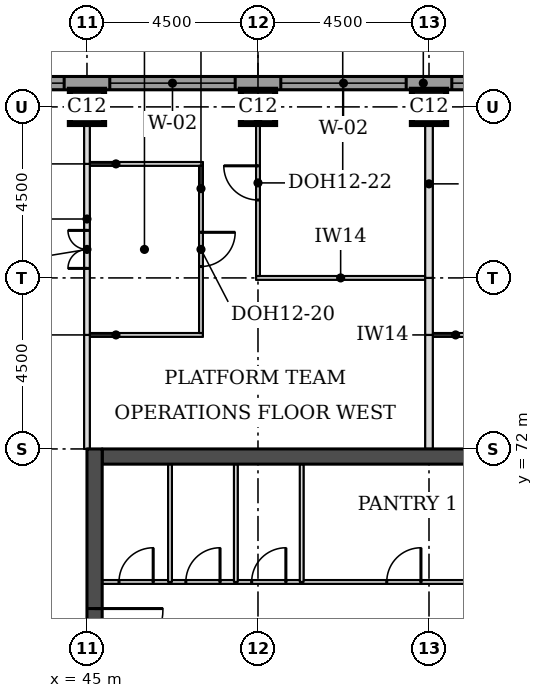
"""IFC4 building model, lengths in metres.
Left out: names, types, materials, properties, quantities, classifications, styles, units other than length and angle.
Written with IfcOpenShell. Run it as: python <this file> out.ifc"""

import sys

from ifc_helpers import new_model, si_unit, direction, frame, frame_2d, origin, origin_2d, place, context, subcontext, project, spatial, rectangle, extrude, element, fill, save


model = new_model("IFC4")
c1 = context("Model", 3, precision=1e-05, world=origin(), true_north=direction((0.0, 1.0)))
c2 = subcontext(c1, "Body", "Model", "MODEL_VIEW")
j1 = project(units=[si_unit("LENGTHUNIT", "METRE"), si_unit("PLANEANGLEUNIT", "RADIAN")], contexts=[c1])
p1 = place(None, origin())
s1 = spatial("IfcSite", under=j1, at=p1, CompositionType="ELEMENT")
p2 = place(p1, origin())
s2 = spatial("IfcBuilding", under=s1, at=p2, CompositionType="ELEMENT")
p3 = place(p2, frame((0.0, 0.0, 252.6)))
s3 = spatial("IfcBuildingStorey", under=s2, at=p3, CompositionType="ELEMENT", Elevation=252.6)
for number, where, z_axis, x_axis in (
    (1, (45.0, 81.0, 0.0), (0.0, 0.0, 1.0), (1.0, 0.0, 0.0)),
    (2, (49.5, 81.0, 0.0), (0.0, 0.0, 1.0), (1.0, 0.0, 0.0)),
    (3, (54.0, 81.0, 0.0), (0.0, 0.0, 1.0), (1.0, 0.0, 0.0)),
):
    element("IfcColumn", number, at=place(p3, frame(where, z_axis=z_axis, x_axis=x_axis)), inside=s3, PredefinedType="COLUMN", context=c2, shape_type="SweptSolid", body=[
        extrude(rectangle(XDim=0.9, YDim=0.9, at=origin_2d()), origin(), (0.0, 0.0, 1.0), 3.7),
    ])
p4 = place(p3, frame((45.4, 71.8, 0.0), z_axis=(0.0, 0.0, 1.0), x_axis=(1.0, 0.0, 0.0)))
e4 = element("IfcWall", 4, at=p4, inside=s3, PredefinedType="SHEAR", context=c2, shape_type="SweptSolid", body=[
    extrude(rectangle(XDim=21.7, YDim=0.4, at=frame_2d((10.85, 0.0))), origin(), (0.0, 0.0, 1.0), 3.7),
])
p5 = place(p3, frame((45.2, 49.5, 0.0), z_axis=(0.0, 0.0, 1.0), x_axis=(0.0, 1.0, 0.0)))
e5 = element("IfcWall", 5, at=p5, inside=s3, PredefinedType="SHEAR", context=c2, shape_type="SweptSolid", body=[
    extrude(rectangle(XDim=22.5, YDim=0.4, at=frame_2d((11.25, 0.0))), origin(), (0.0, 0.0, 1.0), 3.7),
])
p6 = place(p5, frame((4.2, 0.0, 0.0)))
e6 = element("IfcOpeningElement", 6, at=p6, cuts=e5, PredefinedType="OPENING", context=c2, shape_type="SweptSolid", body=[
    extrude(rectangle(XDim=1.8, YDim=2.1, at=frame_2d((0.9, 1.05))), frame((0.0, 0.21, 0.0), z_axis=(0.0, -1.0, 0.0), x_axis=(1.0, 0.0, 0.0)), (0.0, 0.0, 1.0), 0.42),
])
p7 = place(p5, frame((6.9, 0.0, 0.0)))
e7 = element("IfcOpeningElement", 7, at=p7, cuts=e5, PredefinedType="OPENING", context=c2, shape_type="SweptSolid", body=[
    extrude(rectangle(XDim=1.1, YDim=2.1, at=frame_2d((0.55, 1.05))), frame((0.0, 0.21, 0.0), z_axis=(0.0, -1.0, 0.0), x_axis=(1.0, 0.0, 0.0)), (0.0, 0.0, 1.0), 0.42),
])
p8 = place(p5, frame((13.6, 0.0, 0.0)))
e8 = element("IfcOpeningElement", 8, at=p8, cuts=e5, PredefinedType="OPENING", context=c2, shape_type="SweptSolid", body=[
    extrude(rectangle(XDim=1.1, YDim=2.1, at=frame_2d((0.55, 1.05))), frame((0.0, 0.21, 0.0), z_axis=(0.0, -1.0, 0.0), x_axis=(1.0, 0.0, 0.0)), (0.0, 0.0, 1.0), 0.42),
])
p9 = place(p5, frame((16.5, 0.0, 0.0)))
e9 = element("IfcOpeningElement", 9, at=p9, cuts=e5, PredefinedType="OPENING", context=c2, shape_type="SweptSolid", body=[
    extrude(rectangle(XDim=1.8, YDim=2.1, at=frame_2d((0.9, 1.05))), frame((0.0, 0.21, 0.0), z_axis=(0.0, -1.0, 0.0), x_axis=(1.0, 0.0, 0.0)), (0.0, 0.0, 1.0), 0.42),
])
p10 = place(p3, frame((72.331, 81.625, 0.0), z_axis=(0.0, 0.0, 1.0), x_axis=(-1.0, 0.0, 0.0)))
e10 = element("IfcWall", 10, at=p10, inside=s3, PredefinedType="STANDARD", context=c2, shape_type="SweptSolid", body=[
    extrude(rectangle(XDim=32.163, YDim=0.35, at=frame_2d((16.081, 0.0))), origin(), (0.0, 0.0, 1.0), 3.525),
])
p11 = place(p10, frame((0.931, 0.0, 0.9)))
e11 = element("IfcOpeningElement", 11, at=p11, cuts=e10, PredefinedType="OPENING", context=c2, shape_type="SweptSolid", body=[
    extrude(rectangle(XDim=3.3, YDim=1.9, at=frame_2d((1.65, 0.95))), frame((0.0, 0.185, 0.0), z_axis=(0.0, -1.0, 0.0), x_axis=(1.0, 0.0, 0.0)), (0.0, 0.0, 1.0), 0.37),
])
p12 = place(p10, frame((5.431, 0.0, 0.9)))
e12 = element("IfcOpeningElement", 12, at=p12, cuts=e10, PredefinedType="OPENING", context=c2, shape_type="SweptSolid", body=[
    extrude(rectangle(XDim=3.3, YDim=1.9, at=frame_2d((1.65, 0.95))), frame((0.0, 0.185, 0.0), z_axis=(0.0, -1.0, 0.0), x_axis=(1.0, 0.0, 0.0)), (0.0, 0.0, 1.0), 0.37),
])
p13 = place(p10, frame((9.931, 0.0, 0.9)))
e13 = element("IfcOpeningElement", 13, at=p13, cuts=e10, PredefinedType="OPENING", context=c2, shape_type="SweptSolid", body=[
    extrude(rectangle(XDim=3.3, YDim=1.9, at=frame_2d((1.65, 0.95))), frame((0.0, 0.185, 0.0), z_axis=(0.0, -1.0, 0.0), x_axis=(1.0, 0.0, 0.0)), (0.0, 0.0, 1.0), 0.37),
])
p14 = place(p10, frame((14.431, 0.0, 0.9)))
e14 = element("IfcOpeningElement", 14, at=p14, cuts=e10, PredefinedType="OPENING", context=c2, shape_type="SweptSolid", body=[
    extrude(rectangle(XDim=3.3, YDim=1.9, at=frame_2d((1.65, 0.95))), frame((0.0, 0.185, 0.0), z_axis=(0.0, -1.0, 0.0), x_axis=(1.0, 0.0, 0.0)), (0.0, 0.0, 1.0), 0.37),
])
p15 = place(p10, frame((18.931, 0.0, 0.9)))
e15 = element("IfcOpeningElement", 15, at=p15, cuts=e10, PredefinedType="OPENING", context=c2, shape_type="SweptSolid", body=[
    extrude(rectangle(XDim=3.3, YDim=1.9, at=frame_2d((1.65, 0.95))), frame((0.0, 0.185, 0.0), z_axis=(0.0, -1.0, 0.0), x_axis=(1.0, 0.0, 0.0)), (0.0, 0.0, 1.0), 0.37),
])
p16 = place(p10, frame((23.431, 0.0, 0.9)))
e16 = element("IfcOpeningElement", 16, at=p16, cuts=e10, PredefinedType="OPENING", context=c2, shape_type="SweptSolid", body=[
    extrude(rectangle(XDim=3.3, YDim=1.9, at=frame_2d((1.65, 0.95))), frame((0.0, 0.185, 0.0), z_axis=(0.0, -1.0, 0.0), x_axis=(1.0, 0.0, 0.0)), (0.0, 0.0, 1.0), 0.37),
])
p17 = place(p10, frame((27.931, 0.0, 0.9)))
e17 = element("IfcOpeningElement", 17, at=p17, cuts=e10, PredefinedType="OPENING", context=c2, shape_type="SweptSolid", body=[
    extrude(rectangle(XDim=3.3, YDim=1.9, at=frame_2d((1.65, 0.95))), frame((0.0, 0.185, 0.0), z_axis=(0.0, -1.0, 0.0), x_axis=(1.0, 0.0, 0.0)), (0.0, 0.0, 1.0), 0.37),
])
p18 = place(p3, frame((45.075, 75.0, 0.0), z_axis=(0.0, 0.0, 1.0), x_axis=(1.0, 0.0, 0.0)))
e18 = element("IfcWall", 18, at=p18, inside=s3, PredefinedType="PARTITIONING", context=c2, shape_type="SweptSolid", body=[
    extrude(rectangle(XDim=2.975, YDim=0.1, at=frame_2d((1.488, 0.0))), origin(), (0.0, 0.0, 1.0), 3.55),
])
p19 = place(p3, frame((54.1, 75.0, 0.0), z_axis=(0.0, 0.0, 1.0), x_axis=(1.0, 0.0, 0.0)))
e19 = element("IfcWall", 19, at=p19, inside=s3, PredefinedType="PARTITIONING", context=c2, shape_type="SweptSolid", body=[
    extrude(rectangle(XDim=4.4, YDim=0.1, at=frame_2d((2.2, 0.0))), origin(), (0.0, 0.0, 1.0), 3.55),
])
p20 = place(p19, frame((1.75, 0.0, 0.0)))
e20 = element("IfcOpeningElement", 20, at=p20, cuts=e19, PredefinedType="OPENING", context=c2, shape_type="SweptSolid", body=[
    extrude(rectangle(XDim=0.9, YDim=2.1, at=frame_2d((0.45, 1.05))), frame((0.0, 0.06, 0.0), z_axis=(0.0, -1.0, 0.0), x_axis=(1.0, 0.0, 0.0)), (0.0, 0.0, 1.0), 0.12),
])
p21 = place(p3, frame((49.45, 76.5, 0.0), z_axis=(0.0, 0.0, 1.0), x_axis=(1.0, 0.0, 0.0)))
e21 = element("IfcWall", 21, at=p21, inside=s3, PredefinedType="PARTITIONING", context=c2, shape_type="SweptSolid", body=[
    extrude(rectangle(XDim=4.45, YDim=0.1, at=frame_2d((2.225, 0.0))), origin(), (0.0, 0.0, 1.0), 3.55),
])
p22 = place(p3, frame((45.075, 79.5, 0.0), z_axis=(0.0, 0.0, 1.0), x_axis=(1.0, 0.0, 0.0)))
e22 = element("IfcWall", 22, at=p22, inside=s3, PredefinedType="PARTITIONING", context=c2, shape_type="SweptSolid", body=[
    extrude(rectangle(XDim=2.975, YDim=0.1, at=frame_2d((1.488, 0.0))), origin(), (0.0, 0.0, 1.0), 3.55),
])
p23 = place(p3, frame((45.0, 72.0, 0.0), z_axis=(0.0, 0.0, 1.0), x_axis=(0.0, 1.0, 0.0)))
e23 = element("IfcWall", 23, at=p23, inside=s3, PredefinedType="PARTITIONING", context=c2, shape_type="SweptSolid", body=[
    extrude(rectangle(XDim=3.0, YDim=0.15, at=frame_2d((1.5, 0.0))), origin(), (0.0, 0.0, 1.0), 3.022),
])
p24 = place(p3, frame((54.0, 72.0, 0.0), z_axis=(0.0, 0.0, 1.0), x_axis=(0.0, 1.0, 0.0)))
e24 = element("IfcWall", 24, at=p24, inside=s3, PredefinedType="PARTITIONING", context=c2, shape_type="SweptSolid", body=[
    extrude(rectangle(XDim=3.0, YDim=0.2, at=frame_2d((1.5, 0.0))), origin(), (0.0, 0.0, 1.0), 3.55),
])
p25 = place(p3, frame((45.0, 75.0, 0.0), z_axis=(0.0, 0.0, 1.0), x_axis=(0.0, 1.0, 0.0)))
e25 = element("IfcWall", 25, at=p25, inside=s3, PredefinedType="PARTITIONING", context=c2, shape_type="SweptSolid", body=[
    extrude(rectangle(XDim=4.5, YDim=0.15, at=frame_2d((2.25, 0.0))), origin(), (0.0, 0.0, 1.0), 3.022),
])
p26 = place(p25, frame((1.75, 0.0, 0.0)))
e26 = element("IfcOpeningElement", 26, at=p26, cuts=e25, PredefinedType="OPENING", context=c2, shape_type="SweptSolid", body=[
    extrude(rectangle(XDim=1.0, YDim=2.1, at=frame_2d((0.5, 1.05))), frame((0.0, 0.085, 0.0), z_axis=(0.0, -1.0, 0.0), x_axis=(1.0, 0.0, 0.0)), (0.0, 0.0, 1.0), 0.17),
])
p27 = place(p3, frame((54.0, 75.0, 0.0), z_axis=(0.0, 0.0, 1.0), x_axis=(0.0, 1.0, 0.0)))
e27 = element("IfcWall", 27, at=p27, inside=s3, PredefinedType="PARTITIONING", context=c2, shape_type="SweptSolid", body=[
    extrude(rectangle(XDim=1.5, YDim=0.2, at=frame_2d((0.75, 0.0))), origin(), (0.0, 0.0, 1.0), 3.55),
])
p28 = place(p3, frame((48.0, 75.05, 0.0), z_axis=(0.0, 0.0, 1.0), x_axis=(0.0, 1.0, 0.0)))
e28 = element("IfcWall", 28, at=p28, inside=s3, PredefinedType="PARTITIONING", context=c2, shape_type="SweptSolid", body=[
    extrude(rectangle(XDim=4.4, YDim=0.1, at=frame_2d((2.2, 0.0))), origin(), (0.0, 0.0, 1.0), 3.55),
])
p29 = place(p28, frame((1.75, 0.0, 0.0)))
e29 = element("IfcOpeningElement", 29, at=p29, cuts=e28, PredefinedType="OPENING", context=c2, shape_type="SweptSolid", body=[
    extrude(rectangle(XDim=0.9, YDim=2.1, at=frame_2d((0.45, 1.05))), frame((0.0, 0.06, 0.0), z_axis=(0.0, -1.0, 0.0), x_axis=(1.0, 0.0, 0.0)), (0.0, 0.0, 1.0), 0.12),
])
p30 = place(p3, frame((54.0, 76.5, 0.0), z_axis=(0.0, 0.0, 1.0), x_axis=(0.0, 1.0, 0.0)))
e30 = element("IfcWall", 30, at=p30, inside=s3, PredefinedType="PARTITIONING", context=c2, shape_type="SweptSolid", body=[
    extrude(rectangle(XDim=4.95, YDim=0.2, at=frame_2d((2.475, 0.0))), origin(), (0.0, 0.0, 1.0), 3.55),
])
p31 = place(p3, frame((49.5, 76.55, 0.0), z_axis=(0.0, 0.0, 1.0), x_axis=(0.0, 1.0, 0.0)))
e31 = element("IfcWall", 31, at=p31, inside=s3, PredefinedType="PARTITIONING", context=c2, shape_type="SweptSolid", body=[
    extrude(rectangle(XDim=4.9, YDim=0.1, at=frame_2d((2.45, 0.0))), origin(), (0.0, 0.0, 1.0), 3.55),
])
p32 = place(p31, frame((2.0, 0.0, 0.0)))
e32 = element("IfcOpeningElement", 32, at=p32, cuts=e31, PredefinedType="OPENING", context=c2, shape_type="SweptSolid", body=[
    extrude(rectangle(XDim=0.9, YDim=2.1, at=frame_2d((0.45, 1.05))), frame((0.0, 0.06, 0.0), z_axis=(0.0, -1.0, 0.0), x_axis=(1.0, 0.0, 0.0)), (0.0, 0.0, 1.0), 0.12),
])
p33 = place(p3, frame((45.0, 79.5, 0.0), z_axis=(0.0, 0.0, 1.0), x_axis=(0.0, 1.0, 0.0)))
e33 = element("IfcWall", 33, at=p33, inside=s3, PredefinedType="PARTITIONING", context=c2, shape_type="SweptSolid", body=[
    extrude(rectangle(XDim=1.95, YDim=0.15, at=frame_2d((0.975, 0.0))), origin(), (0.0, 0.0, 1.0), 3.022),
])
p34 = place(p3, frame((45.4, 68.5, 0.0), z_axis=(0.0, 0.0, 1.0), x_axis=(1.0, 0.0, 0.0)))
e34 = element("IfcWall", 34, at=p34, inside=s3, PredefinedType="PARTITIONING", context=c2, shape_type="SweptSolid", body=[
    extrude(rectangle(XDim=21.7, YDim=0.1, at=frame_2d((10.85, 0.0))), origin(), (0.0, 0.0, 1.0), 3.55),
])
p35 = place(p34, frame((19.938, 0.0, 0.0)))
e35 = element("IfcOpeningElement", 35, at=p35, cuts=e34, PredefinedType="OPENING", context=c2, shape_type="SweptSolid", body=[
    extrude(rectangle(XDim=0.9, YDim=2.1, at=frame_2d((0.45, 1.05))), frame((0.0, 0.06, 0.0), z_axis=(0.0, -1.0, 0.0), x_axis=(1.0, 0.0, 0.0)), (0.0, 0.0, 1.0), 0.12),
])
p36 = place(p34, frame((17.312, 0.0, 0.0)))
e36 = element("IfcOpeningElement", 36, at=p36, cuts=e34, PredefinedType="OPENING", context=c2, shape_type="SweptSolid", body=[
    extrude(rectangle(XDim=0.9, YDim=2.1, at=frame_2d((0.45, 1.05))), frame((0.0, 0.06, 0.0), z_axis=(0.0, -1.0, 0.0), x_axis=(1.0, 0.0, 0.0)), (0.0, 0.0, 1.0), 0.12),
])
p37 = place(p34, frame((0.442, 0.0, 0.0)))
e37 = element("IfcOpeningElement", 37, at=p37, cuts=e34, PredefinedType="OPENING", context=c2, shape_type="SweptSolid", body=[
    extrude(rectangle(XDim=0.9, YDim=2.1, at=frame_2d((0.45, 1.05))), frame((0.0, 0.06, 0.0), z_axis=(0.0, -1.0, 0.0), x_axis=(1.0, 0.0, 0.0)), (0.0, 0.0, 1.0), 0.12),
])
p38 = place(p34, frame((2.201, 0.0, 0.0)))
e38 = element("IfcOpeningElement", 38, at=p38, cuts=e34, PredefinedType="OPENING", context=c2, shape_type="SweptSolid", body=[
    extrude(rectangle(XDim=0.9, YDim=2.1, at=frame_2d((0.45, 1.05))), frame((0.0, 0.06, 0.0), z_axis=(0.0, -1.0, 0.0), x_axis=(1.0, 0.0, 0.0)), (0.0, 0.0, 1.0), 0.12),
])
p39 = place(p34, frame((3.934, 0.0, 0.0)))
e39 = element("IfcOpeningElement", 39, at=p39, cuts=e34, PredefinedType="OPENING", context=c2, shape_type="SweptSolid", body=[
    extrude(rectangle(XDim=0.9, YDim=2.1, at=frame_2d((0.45, 1.05))), frame((0.0, 0.06, 0.0), z_axis=(0.0, -1.0, 0.0), x_axis=(1.0, 0.0, 0.0)), (0.0, 0.0, 1.0), 0.12),
])
p40 = place(p34, frame((14.432, 0.0, 0.0)))
e40 = element("IfcOpeningElement", 40, at=p40, cuts=e34, PredefinedType="OPENING", context=c2, shape_type="SweptSolid", body=[
    extrude(rectangle(XDim=0.9, YDim=2.1, at=frame_2d((0.45, 1.05))), frame((0.0, 0.06, 0.0), z_axis=(0.0, -1.0, 0.0), x_axis=(1.0, 0.0, 0.0)), (0.0, 0.0, 1.0), 0.12),
])
p41 = place(p34, frame((11.52, 0.0, 0.0)))
e41 = element("IfcOpeningElement", 41, at=p41, cuts=e34, PredefinedType="OPENING", context=c2, shape_type="SweptSolid", body=[
    extrude(rectangle(XDim=0.9, YDim=2.1, at=frame_2d((0.45, 1.05))), frame((0.0, 0.06, 0.0), z_axis=(0.0, -1.0, 0.0), x_axis=(1.0, 0.0, 0.0)), (0.0, 0.0, 1.0), 0.12),
])
p42 = place(p34, frame((7.488, 0.0, 0.0)))
e42 = element("IfcOpeningElement", 42, at=p42, cuts=e34, PredefinedType="OPENING", context=c2, shape_type="SweptSolid", body=[
    extrude(rectangle(XDim=0.9, YDim=2.1, at=frame_2d((0.45, 1.05))), frame((0.0, 0.06, 0.0), z_axis=(0.0, -1.0, 0.0), x_axis=(1.0, 0.0, 0.0)), (0.0, 0.0, 1.0), 0.12),
])
for number, where, z_axis, x_axis in (
    (43, (47.185, 68.5, 0.0), (0.0, 0.0, 1.0), (0.0, 1.0, 0.0)),
    (44, (48.917, 68.5, 0.0), (0.0, 0.0, 1.0), (0.0, 1.0, 0.0)),
    (45, (50.65, 68.5, 0.0), (0.0, 0.0, 1.0), (0.0, 1.0, 0.0)),
):
    element("IfcWall", number, at=place(p3, frame(where, z_axis=z_axis, x_axis=x_axis)), inside=s3, PredefinedType="PARTITIONING", context=c2, shape_type="SweptSolid", body=[
        extrude(rectangle(XDim=3.1, YDim=0.1, at=frame_2d((1.55, 0.0))), origin(), (0.0, 0.0, 1.0), 3.55),
    ])
p43 = place(p14, origin())
e46 = element("IfcWindow", 46, at=p43, inside=s3, PartitioningType="SINGLE_PANEL", PredefinedType="WINDOW", context=c2, shape_type="SweptSolid", body=[
    extrude(rectangle(XDim=3.3, YDim=1.9, at=frame_2d((1.65, 0.95))), frame((0.0, 0.085, 0.0), z_axis=(0.0, -1.0, 0.0), x_axis=(1.0, 0.0, 0.0)), (0.0, 0.0, 1.0), 0.06),
])
fill(e14, e46)
p44 = place(p15, origin())
e47 = element("IfcWindow", 47, at=p44, inside=s3, PartitioningType="SINGLE_PANEL", PredefinedType="WINDOW", context=c2, shape_type="SweptSolid", body=[
    extrude(rectangle(XDim=3.3, YDim=1.9, at=frame_2d((1.65, 0.95))), frame((0.0, 0.085, 0.0), z_axis=(0.0, -1.0, 0.0), x_axis=(1.0, 0.0, 0.0)), (0.0, 0.0, 1.0), 0.06),
])
fill(e15, e47)
p45 = place(p16, origin())
e48 = element("IfcWindow", 48, at=p45, inside=s3, PartitioningType="SINGLE_PANEL", PredefinedType="WINDOW", context=c2, shape_type="SweptSolid", body=[
    extrude(rectangle(XDim=3.3, YDim=1.9, at=frame_2d((1.65, 0.95))), frame((0.0, 0.085, 0.0), z_axis=(0.0, -1.0, 0.0), x_axis=(1.0, 0.0, 0.0)), (0.0, 0.0, 1.0), 0.06),
])
fill(e16, e48)
p46 = place(p17, origin())
e49 = element("IfcWindow", 49, at=p46, inside=s3, PartitioningType="SINGLE_PANEL", PredefinedType="WINDOW", context=c2, shape_type="SweptSolid", body=[
    extrude(rectangle(XDim=3.3, YDim=1.9, at=frame_2d((1.65, 0.95))), frame((0.0, 0.085, 0.0), z_axis=(0.0, -1.0, 0.0), x_axis=(1.0, 0.0, 0.0)), (0.0, 0.0, 1.0), 0.06),
])
fill(e17, e49)
p47 = place(p26, origin())
e50 = element("IfcDoor", 50, at=p47, inside=s3, OperationType="DOUBLE_DOOR_SINGLE_SWING", PredefinedType="DOOR", context=c2, shape_type="SweptSolid", body=[
    extrude(rectangle(XDim=1.0, YDim=2.1, at=frame_2d((0.5, 1.05))), frame((0.0, 0.025, 0.0), z_axis=(0.0, -1.0, 0.0), x_axis=(1.0, 0.0, 0.0)), (0.0, 0.0, 1.0), 0.05),
])
fill(e26, e50)
p48 = place(p29, frame((0.9, 0.0, 0.0), z_axis=(0.0, 0.0, 1.0), x_axis=(-1.0, 0.0, 0.0)))
e51 = element("IfcDoor", 51, at=p48, inside=s3, OperationType="SINGLE_SWING_LEFT", PredefinedType="DOOR", context=c2, shape_type="SweptSolid", body=[
    extrude(rectangle(XDim=0.9, YDim=2.1, at=frame_2d((0.45, 1.05))), frame((0.0, 0.025, 0.0), z_axis=(0.0, -1.0, 0.0), x_axis=(1.0, 0.0, 0.0)), (0.0, 0.0, 1.0), 0.05),
])
fill(e29, e51)
p49 = place(p32, origin())
e52 = element("IfcDoor", 52, at=p49, inside=s3, OperationType="SINGLE_SWING_RIGHT", PredefinedType="DOOR", context=c2, shape_type="SweptSolid", body=[
    extrude(rectangle(XDim=0.9, YDim=2.1, at=frame_2d((0.45, 1.05))), frame((0.0, 0.025, 0.0), z_axis=(0.0, -1.0, 0.0), x_axis=(1.0, 0.0, 0.0)), (0.0, 0.0, 1.0), 0.05),
])
fill(e32, e52)
p50 = place(p9, frame((1.8, 0.0, 0.0), z_axis=(0.0, 0.0, 1.0), x_axis=(-1.0, 0.0, 0.0)))
e53 = element("IfcDoor", 53, at=p50, inside=s3, OperationType="SINGLE_SWING_LEFT", PredefinedType="DOOR", context=c2, shape_type="SweptSolid", body=[
    extrude(rectangle(XDim=1.8, YDim=2.1, at=frame_2d((0.9, 1.05))), frame((0.0, 0.025, 0.0), z_axis=(0.0, -1.0, 0.0), x_axis=(1.0, 0.0, 0.0)), (0.0, 0.0, 1.0), 0.05),
])
fill(e9, e53)
p51 = place(p37, origin())
e54 = element("IfcDoor", 54, at=p51, inside=s3, OperationType="SINGLE_SWING_RIGHT", PredefinedType="DOOR", context=c2, shape_type="SweptSolid", body=[
    extrude(rectangle(XDim=0.9, YDim=2.1, at=frame_2d((0.45, 1.05))), frame((0.0, 0.025, 0.0), z_axis=(0.0, -1.0, 0.0), x_axis=(1.0, 0.0, 0.0)), (0.0, 0.0, 1.0), 0.05),
])
fill(e37, e54)
p52 = place(p38, origin())
e55 = element("IfcDoor", 55, at=p52, inside=s3, OperationType="SINGLE_SWING_RIGHT", PredefinedType="DOOR", context=c2, shape_type="SweptSolid", body=[
    extrude(rectangle(XDim=0.9, YDim=2.1, at=frame_2d((0.45, 1.05))), frame((0.0, 0.025, 0.0), z_axis=(0.0, -1.0, 0.0), x_axis=(1.0, 0.0, 0.0)), (0.0, 0.0, 1.0), 0.05),
])
fill(e38, e55)
p53 = place(p39, origin())
e56 = element("IfcDoor", 56, at=p53, inside=s3, OperationType="SINGLE_SWING_RIGHT", PredefinedType="DOOR", context=c2, shape_type="SweptSolid", body=[
    extrude(rectangle(XDim=0.9, YDim=2.1, at=frame_2d((0.45, 1.05))), frame((0.0, 0.025, 0.0), z_axis=(0.0, -1.0, 0.0), x_axis=(1.0, 0.0, 0.0)), (0.0, 0.0, 1.0), 0.05),
])
fill(e39, e56)
p54 = place(p42, origin())
e57 = element("IfcDoor", 57, at=p54, inside=s3, OperationType="SINGLE_SWING_RIGHT", PredefinedType="DOOR", context=c2, shape_type="SweptSolid", body=[
    extrude(rectangle(XDim=0.9, YDim=2.1, at=frame_2d((0.45, 1.05))), frame((0.0, 0.025, 0.0), z_axis=(0.0, -1.0, 0.0), x_axis=(1.0, 0.0, 0.0)), (0.0, 0.0, 1.0), 0.05),
])
fill(e42, e57)
save(model, sys.argv[1])
